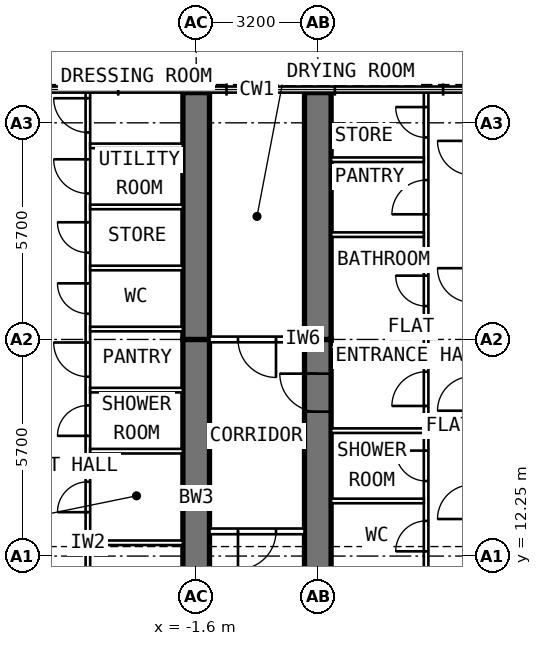
"""IFC4 building model, lengths in metres.
Left out: names, types, materials, properties, quantities, classifications, styles, units other than length and angle.
Written with IfcOpenShell. Run it as: python <this file> out.ifc"""

import sys

from ifc_helpers import new_model, si_unit, direction, frame, frame_2d, origin, place, context, subcontext, project, spatial, rectangle, extrude, element, fill, save


model = new_model("IFC4")
c1 = context("Model", 3, precision=1e-05, world=origin(), true_north=direction((0.0, 1.0)))
c2 = subcontext(c1, "Body", "Model", "MODEL_VIEW")
j1 = project(units=[si_unit("LENGTHUNIT", "METRE"), si_unit("PLANEANGLEUNIT", "RADIAN")], contexts=[c1])
p1 = place(None, origin())
s1 = spatial("IfcSite", under=j1, at=p1, CompositionType="ELEMENT")
p2 = place(p1, origin())
s2 = spatial("IfcBuilding", under=s1, at=p2, CompositionType="ELEMENT")
p3 = place(p2, frame((0.0, 0.0, 292.6)))
s3 = spatial("IfcBuildingStorey", under=s2, at=p3, CompositionType="ELEMENT", Elevation=292.6)
p4 = place(p3, frame((-1.6, 9.6, 0.0), z_axis=(0.0, 0.0, 1.0), x_axis=(0.0, 1.0, 0.0)))
e1 = element("IfcWall", 1, at=p4, inside=s3, PredefinedType="SHEAR", context=c2, shape_type="SweptSolid", body=[
    extrude(rectangle(XDim=8.35, YDim=0.7, at=frame_2d((4.175, 0.0))), origin(), (0.0, 0.0, 1.0), 3.6),
])
p5 = place(p4, frame((1.3, 0.0, 0.0)))
e2 = element("IfcOpeningElement", 2, at=p5, cuts=e1, PredefinedType="OPENING", context=c2, shape_type="SweptSolid", body=[
    extrude(rectangle(XDim=1.0, YDim=2.1, at=frame_2d((0.5, 1.05))), frame((0.0, 0.362, 0.0), z_axis=(0.0, -1.0, 0.0), x_axis=(1.0, 0.0, 0.0)), (0.0, 0.0, 1.0), 0.724),
])
p6 = place(p3, frame((-1.6, 17.95, 0.0), z_axis=(0.0, 0.0, 1.0), x_axis=(0.0, 1.0, 0.0)))
e3 = element("IfcWall", 3, at=p6, inside=s3, PredefinedType="SHEAR", context=c2, shape_type="SweptSolid", body=[
    extrude(rectangle(XDim=6.495, YDim=0.7, at=frame_2d((3.248, 0.0))), origin(), (0.0, 0.0, 1.0), 3.6),
])
p7 = place(p3, frame((1.6, 9.6, 0.0), z_axis=(0.0, 0.0, 1.0), x_axis=(0.0, 1.0, 0.0)))
e4 = element("IfcWall", 4, at=p7, inside=s3, PredefinedType="SHEAR", context=c2, shape_type="SweptSolid", body=[
    extrude(rectangle(XDim=8.35, YDim=0.7, at=frame_2d((4.175, 0.0))), origin(), (0.0, 0.0, 1.0), 3.6),
])
p8 = place(p7, frame((6.45, 0.0, 0.0)))
e5 = element("IfcOpeningElement", 5, at=p8, cuts=e4, PredefinedType="OPENING", context=c2, shape_type="SweptSolid", body=[
    extrude(rectangle(XDim=1.0, YDim=2.1, at=frame_2d((0.5, 1.05))), frame((0.0, 0.362, 0.0), z_axis=(0.0, -1.0, 0.0), x_axis=(1.0, 0.0, 0.0)), (0.0, 0.0, 1.0), 0.724),
])
p9 = place(p3, frame((1.6, 17.95, 0.0), z_axis=(0.0, 0.0, 1.0), x_axis=(0.0, 1.0, 0.0)))
e6 = element("IfcWall", 6, at=p9, inside=s3, PredefinedType="SHEAR", context=c2, shape_type="SweptSolid", body=[
    extrude(rectangle(XDim=6.495, YDim=0.7, at=frame_2d((3.248, 0.0))), origin(), (0.0, 0.0, 1.0), 3.6),
])
p10 = place(p3, frame((-4.45, 9.85, 0.0), z_axis=(0.0, 0.0, 1.0), x_axis=(0.0, 1.0, 0.0)))
e7 = element("IfcWall", 7, at=p10, inside=s3, PredefinedType="PARTITIONING", context=c2, shape_type="SweptSolid", body=[
    extrude(rectangle(XDim=14.595, YDim=0.12, at=frame_2d((7.297, 0.0))), origin(), (0.0, 0.0, 1.0), 3.35),
])
p11 = place(p10, frame((1.0, 0.0, 0.0)))
e8 = element("IfcOpeningElement", 8, at=p11, cuts=e7, PredefinedType="OPENING", context=c2, shape_type="SweptSolid", body=[
    extrude(rectangle(XDim=0.9, YDim=2.1, at=frame_2d((0.45, 1.05))), frame((0.0, 0.072, 0.0), z_axis=(0.0, -1.0, 0.0), x_axis=(1.0, 0.0, 0.0)), (0.0, 0.0, 1.0), 0.144),
])
p12 = place(p10, frame((3.555, 0.0, 0.0)))
e9 = element("IfcOpeningElement", 9, at=p12, cuts=e7, PredefinedType="OPENING", context=c2, shape_type="SweptSolid", body=[
    extrude(rectangle(XDim=0.8, YDim=2.1, at=frame_2d((0.4, 1.05))), frame((0.0, 0.072, 0.0), z_axis=(0.0, -1.0, 0.0), x_axis=(1.0, 0.0, 0.0)), (0.0, 0.0, 1.0), 0.144),
])
p13 = place(p10, frame((5.563, 0.0, 0.0)))
e10 = element("IfcOpeningElement", 10, at=p13, cuts=e7, PredefinedType="OPENING", context=c2, shape_type="SweptSolid", body=[
    extrude(rectangle(XDim=0.8, YDim=2.1, at=frame_2d((0.4, 1.05))), frame((0.0, 0.072, 0.0), z_axis=(0.0, -1.0, 0.0), x_axis=(1.0, 0.0, 0.0)), (0.0, 0.0, 1.0), 0.144),
])
p14 = place(p10, frame((7.12, 0.0, 0.0)))
e11 = element("IfcOpeningElement", 11, at=p14, cuts=e7, PredefinedType="OPENING", context=c2, shape_type="SweptSolid", body=[
    extrude(rectangle(XDim=0.9, YDim=2.1, at=frame_2d((0.45, 1.05))), frame((0.0, 0.072, 0.0), z_axis=(0.0, -1.0, 0.0), x_axis=(1.0, 0.0, 0.0)), (0.0, 0.0, 1.0), 0.144),
])
p15 = place(p10, frame((8.777, 0.0, 0.0)))
e12 = element("IfcOpeningElement", 12, at=p15, cuts=e7, PredefinedType="OPENING", context=c2, shape_type="SweptSolid", body=[
    extrude(rectangle(XDim=0.8, YDim=2.1, at=frame_2d((0.4, 1.05))), frame((0.0, 0.072, 0.0), z_axis=(0.0, -1.0, 0.0), x_axis=(1.0, 0.0, 0.0)), (0.0, 0.0, 1.0), 0.144),
])
p16 = place(p10, frame((10.383, 0.0, 0.0)))
e13 = element("IfcOpeningElement", 13, at=p16, cuts=e7, PredefinedType="OPENING", context=c2, shape_type="SweptSolid", body=[
    extrude(rectangle(XDim=0.8, YDim=2.1, at=frame_2d((0.4, 1.05))), frame((0.0, 0.072, 0.0), z_axis=(0.0, -1.0, 0.0), x_axis=(1.0, 0.0, 0.0)), (0.0, 0.0, 1.0), 0.144),
])
p17 = place(p10, frame((11.94, 0.0, 0.0)))
e14 = element("IfcOpeningElement", 14, at=p17, cuts=e7, PredefinedType="OPENING", context=c2, shape_type="SweptSolid", body=[
    extrude(rectangle(XDim=0.9, YDim=2.1, at=frame_2d((0.45, 1.05))), frame((0.0, 0.072, 0.0), z_axis=(0.0, -1.0, 0.0), x_axis=(1.0, 0.0, 0.0)), (0.0, 0.0, 1.0), 0.144),
])
p18 = place(p10, frame((13.547, 0.0, 0.0)))
e15 = element("IfcOpeningElement", 15, at=p18, cuts=e7, PredefinedType="OPENING", context=c2, shape_type="SweptSolid", body=[
    extrude(rectangle(XDim=0.9, YDim=2.1, at=frame_2d((0.45, 1.05))), frame((0.0, 0.072, 0.0), z_axis=(0.0, -1.0, 0.0), x_axis=(1.0, 0.0, 0.0)), (0.0, 0.0, 1.0), 0.144),
])
p19 = place(p3, frame((-1.95, 12.6, 0.0), z_axis=(0.0, 0.0, 1.0), x_axis=(-1.0, 0.0, 0.0)))
e16 = element("IfcWall", 16, at=p19, inside=s3, PredefinedType="PARTITIONING", context=c2, shape_type="SweptSolid", body=[
    extrude(rectangle(XDim=2.44, YDim=0.12, at=frame_2d((1.22, 0.0))), origin(), (0.0, 0.0, 1.0), 2.45),
])
for number, where, z_axis, x_axis in (
    (17, (-1.95, 15.01, 0.0), (0.0, 0.0, 1.0), (-1.0, 0.0, 0.0)),
    (18, (-1.95, 16.617, 0.0), (0.0, 0.0, 1.0), (-1.0, 0.0, 0.0)),
):
    element("IfcWall", number, at=place(p3, frame(where, z_axis=z_axis, x_axis=x_axis)), inside=s3, PredefinedType="PARTITIONING", context=c2, shape_type="SweptSolid", body=[
        extrude(rectangle(XDim=2.44, YDim=0.12, at=frame_2d((1.22, 0.0))), origin(), (0.0, 0.0, 1.0), 3.35),
    ])
p20 = place(p3, frame((-1.95, 18.223, 0.0), z_axis=(0.0, 0.0, 1.0), x_axis=(-1.0, 0.0, 0.0)))
e19 = element("IfcWall", 19, at=p20, inside=s3, PredefinedType="PARTITIONING", context=c2, shape_type="SweptSolid", body=[
    extrude(rectangle(XDim=2.44, YDim=0.12, at=frame_2d((1.22, 0.0))), origin(), (0.0, 0.0, 1.0), 2.45),
])
for number, where, z_axis, x_axis in (
    (20, (-1.95, 19.83, 0.0), (0.0, 0.0, 1.0), (-1.0, 0.0, 0.0)),
    (21, (-1.95, 21.437, 0.0), (0.0, 0.0, 1.0), (-1.0, 0.0, 0.0)),
    (22, (-1.95, 23.043, 0.0), (0.0, 0.0, 1.0), (-1.0, 0.0, 0.0)),
):
    element("IfcWall", number, at=place(p3, frame(where, z_axis=z_axis, x_axis=x_axis)), inside=s3, PredefinedType="PARTITIONING", context=c2, shape_type="SweptSolid", body=[
        extrude(rectangle(XDim=2.44, YDim=0.12, at=frame_2d((1.22, 0.0))), origin(), (0.0, 0.0, 1.0), 3.35),
    ])
p21 = place(p3, frame((4.45, 9.85, 0.0), z_axis=(0.0, 0.0, 1.0), x_axis=(0.0, 1.0, 0.0)))
e23 = element("IfcWall", 23, at=p21, inside=s3, PredefinedType="PARTITIONING", context=c2, shape_type="SweptSolid", body=[
    extrude(rectangle(XDim=14.595, YDim=0.12, at=frame_2d((7.297, 0.0))), origin(), (0.0, 0.0, 1.0), 3.35),
])
p22 = place(p21, frame((0.625, 0.0, 0.0)))
e24 = element("IfcOpeningElement", 24, at=p22, cuts=e23, PredefinedType="OPENING", context=c2, shape_type="SweptSolid", body=[
    extrude(rectangle(XDim=0.9, YDim=2.1, at=frame_2d((0.45, 1.05))), frame((0.0, 0.072, 0.0), z_axis=(0.0, -1.0, 0.0), x_axis=(1.0, 0.0, 0.0)), (0.0, 0.0, 1.0), 0.144),
])
p23 = place(p21, frame((2.525, 0.0, 0.0)))
e25 = element("IfcOpeningElement", 25, at=p23, cuts=e23, PredefinedType="OPENING", context=c2, shape_type="SweptSolid", body=[
    extrude(rectangle(XDim=0.8, YDim=2.1, at=frame_2d((0.4, 1.05))), frame((0.0, 0.072, 0.0), z_axis=(0.0, -1.0, 0.0), x_axis=(1.0, 0.0, 0.0)), (0.0, 0.0, 1.0), 0.144),
])
p24 = place(p21, frame((4.375, 0.0, 0.0)))
e26 = element("IfcOpeningElement", 26, at=p24, cuts=e23, PredefinedType="OPENING", context=c2, shape_type="SweptSolid", body=[
    extrude(rectangle(XDim=0.8, YDim=2.1, at=frame_2d((0.4, 1.05))), frame((0.0, 0.072, 0.0), z_axis=(0.0, -1.0, 0.0), x_axis=(1.0, 0.0, 0.0)), (0.0, 0.0, 1.0), 0.144),
])
p25 = place(p21, frame((6.35, 0.0, 0.0)))
e27 = element("IfcOpeningElement", 27, at=p25, cuts=e23, PredefinedType="OPENING", context=c2, shape_type="SweptSolid", body=[
    extrude(rectangle(XDim=0.9, YDim=2.1, at=frame_2d((0.45, 1.05))), frame((0.0, 0.072, 0.0), z_axis=(0.0, -1.0, 0.0), x_axis=(1.0, 0.0, 0.0)), (0.0, 0.0, 1.0), 0.144),
])
p26 = place(p21, frame((8.979, 0.0, 0.0)))
e28 = element("IfcOpeningElement", 28, at=p26, cuts=e23, PredefinedType="OPENING", context=c2, shape_type="SweptSolid", body=[
    extrude(rectangle(XDim=0.8, YDim=2.1, at=frame_2d((0.4, 1.05))), frame((0.0, 0.072, 0.0), z_axis=(0.0, -1.0, 0.0), x_axis=(1.0, 0.0, 0.0)), (0.0, 0.0, 1.0), 0.144),
])
p27 = place(p21, frame((11.393, 0.0, 0.0)))
e29 = element("IfcOpeningElement", 29, at=p27, cuts=e23, PredefinedType="OPENING", context=c2, shape_type="SweptSolid", body=[
    extrude(rectangle(XDim=0.9, YDim=2.1, at=frame_2d((0.45, 1.05))), frame((0.0, 0.072, 0.0), z_axis=(0.0, -1.0, 0.0), x_axis=(1.0, 0.0, 0.0)), (0.0, 0.0, 1.0), 0.144),
])
p28 = place(p21, frame((13.414, 0.0, 0.0)))
e30 = element("IfcOpeningElement", 30, at=p28, cuts=e23, PredefinedType="OPENING", context=c2, shape_type="SweptSolid", body=[
    extrude(rectangle(XDim=0.8, YDim=2.1, at=frame_2d((0.4, 1.05))), frame((0.0, 0.072, 0.0), z_axis=(0.0, -1.0, 0.0), x_axis=(1.0, 0.0, 0.0)), (0.0, 0.0, 1.0), 0.144),
])
for number, where, z_axis, x_axis in (
    (31, (1.95, 13.7, 0.0), (0.0, 0.0, 1.0), (1.0, 0.0, 0.0)),
    (32, (1.95, 15.55, 0.0), (0.0, 0.0, 1.0), (1.0, 0.0, 0.0)),
):
    element("IfcWall", number, at=place(p3, frame(where, z_axis=z_axis, x_axis=x_axis)), inside=s3, PredefinedType="PARTITIONING", context=c2, shape_type="SweptSolid", body=[
        extrude(rectangle(XDim=2.44, YDim=0.12, at=frame_2d((1.22, 0.0))), origin(), (0.0, 0.0, 1.0), 3.35),
    ])
p29 = place(p3, frame((1.95, 17.75, 0.0), z_axis=(0.0, 0.0, 1.0), x_axis=(1.0, 0.0, 0.0)))
e33 = element("IfcWall", 33, at=p29, inside=s3, PredefinedType="PARTITIONING", context=c2, shape_type="SweptSolid", body=[
    extrude(rectangle(XDim=2.44, YDim=0.12, at=frame_2d((1.22, 0.0))), origin(), (0.0, 0.0, 1.0), 2.45),
])
for number, where, z_axis, x_axis in (
    (34, (1.95, 20.707, 0.0), (0.0, 0.0, 1.0), (1.0, 0.0, 0.0)),
    (35, (1.95, 22.678, 0.0), (0.0, 0.0, 1.0), (1.0, 0.0, 0.0)),
):
    element("IfcWall", number, at=place(p3, frame(where, z_axis=z_axis, x_axis=x_axis)), inside=s3, PredefinedType="PARTITIONING", context=c2, shape_type="SweptSolid", body=[
        extrude(rectangle(XDim=2.44, YDim=0.12, at=frame_2d((1.22, 0.0))), origin(), (0.0, 0.0, 1.0), 3.35),
    ])
p30 = place(p3, frame((1.25, 17.95, 0.0), z_axis=(0.0, 0.0, 1.0), x_axis=(-1.0, 0.0, 0.0)))
e36 = element("IfcWall", 36, at=p30, inside=s3, PredefinedType="PARTITIONING", context=c2, shape_type="SweptSolid", body=[
    extrude(rectangle(XDim=2.5, YDim=0.15, at=frame_2d((1.25, 0.0))), origin(), (0.0, 0.0, 1.0), 3.35),
])
p31 = place(p30, frame((0.75, 0.0, 0.0)))
e37 = element("IfcOpeningElement", 37, at=p31, cuts=e36, PredefinedType="OPENING", context=c2, shape_type="SweptSolid", body=[
    extrude(rectangle(XDim=1.0, YDim=2.1, at=frame_2d((0.5, 1.05))), frame((0.0, 0.087, 0.0), z_axis=(0.0, -1.0, 0.0), x_axis=(1.0, 0.0, 0.0)), (0.0, 0.0, 1.0), 0.174),
])
p32 = place(p3, frame((1.25, 12.9, 0.0), z_axis=(0.0, 0.0, 1.0), x_axis=(-1.0, 0.0, 0.0)))
e38 = element("IfcWall", 38, at=p32, inside=s3, PredefinedType="PARTITIONING", context=c2, shape_type="SweptSolid", body=[
    extrude(rectangle(XDim=2.5, YDim=0.15, at=frame_2d((1.25, 0.0))), origin(), (0.0, 0.0, 1.0), 3.35),
])
p33 = place(p32, frame((0.75, 0.0, 0.0)))
e39 = element("IfcOpeningElement", 39, at=p33, cuts=e38, PredefinedType="OPENING", context=c2, shape_type="SweptSolid", body=[
    extrude(rectangle(XDim=1.0, YDim=2.1, at=frame_2d((0.5, 1.05))), frame((0.0, 0.087, 0.0), z_axis=(0.0, -1.0, 0.0), x_axis=(1.0, 0.0, 0.0)), (0.0, 0.0, 1.0), 0.174),
])
p34 = place(p12, origin())
e40 = element("IfcDoor", 40, at=p34, inside=s3, OperationType="SINGLE_SWING_LEFT", PredefinedType="DOOR", context=c2, shape_type="SweptSolid", body=[
    extrude(rectangle(XDim=0.8, YDim=2.1, at=frame_2d((0.4, 1.05))), frame((0.0, 0.025, 0.0), z_axis=(0.0, -1.0, 0.0), x_axis=(1.0, 0.0, 0.0)), (0.0, 0.0, 1.0), 0.05),
])
fill(e9, e40)
p35 = place(p13, origin())
e41 = element("IfcDoor", 41, at=p35, inside=s3, OperationType="SINGLE_SWING_LEFT", PredefinedType="DOOR", context=c2, shape_type="SweptSolid", body=[
    extrude(rectangle(XDim=0.8, YDim=2.1, at=frame_2d((0.4, 1.05))), frame((0.0, 0.025, 0.0), z_axis=(0.0, -1.0, 0.0), x_axis=(1.0, 0.0, 0.0)), (0.0, 0.0, 1.0), 0.05),
])
fill(e10, e41)
p36 = place(p14, origin())
e42 = element("IfcDoor", 42, at=p36, inside=s3, OperationType="SINGLE_SWING_RIGHT", PredefinedType="DOOR", context=c2, shape_type="SweptSolid", body=[
    extrude(rectangle(XDim=0.9, YDim=2.1, at=frame_2d((0.45, 1.05))), frame((0.0, 0.025, 0.0), z_axis=(0.0, -1.0, 0.0), x_axis=(1.0, 0.0, 0.0)), (0.0, 0.0, 1.0), 0.05),
])
fill(e11, e42)
p37 = place(p15, origin())
e43 = element("IfcDoor", 43, at=p37, inside=s3, OperationType="SINGLE_SWING_RIGHT", PredefinedType="DOOR", context=c2, shape_type="SweptSolid", body=[
    extrude(rectangle(XDim=0.8, YDim=2.1, at=frame_2d((0.4, 1.05))), frame((0.0, 0.025, 0.0), z_axis=(0.0, -1.0, 0.0), x_axis=(1.0, 0.0, 0.0)), (0.0, 0.0, 1.0), 0.05),
])
fill(e12, e43)
p38 = place(p16, origin())
e44 = element("IfcDoor", 44, at=p38, inside=s3, OperationType="SINGLE_SWING_RIGHT", PredefinedType="DOOR", context=c2, shape_type="SweptSolid", body=[
    extrude(rectangle(XDim=0.8, YDim=2.1, at=frame_2d((0.4, 1.05))), frame((0.0, 0.025, 0.0), z_axis=(0.0, -1.0, 0.0), x_axis=(1.0, 0.0, 0.0)), (0.0, 0.0, 1.0), 0.05),
])
fill(e13, e44)
p39 = place(p17, origin())
e45 = element("IfcDoor", 45, at=p39, inside=s3, OperationType="SINGLE_SWING_RIGHT", PredefinedType="DOOR", context=c2, shape_type="SweptSolid", body=[
    extrude(rectangle(XDim=0.9, YDim=2.1, at=frame_2d((0.45, 1.05))), frame((0.0, 0.025, 0.0), z_axis=(0.0, -1.0, 0.0), x_axis=(1.0, 0.0, 0.0)), (0.0, 0.0, 1.0), 0.05),
])
fill(e14, e45)
p40 = place(p18, origin())
e46 = element("IfcDoor", 46, at=p40, inside=s3, OperationType="SINGLE_SWING_RIGHT", PredefinedType="DOOR", context=c2, shape_type="SweptSolid", body=[
    extrude(rectangle(XDim=0.9, YDim=2.1, at=frame_2d((0.45, 1.05))), frame((0.0, 0.025, 0.0), z_axis=(0.0, -1.0, 0.0), x_axis=(1.0, 0.0, 0.0)), (0.0, 0.0, 1.0), 0.05),
])
fill(e15, e46)
p41 = place(p8, origin())
e47 = element("IfcDoor", 47, at=p41, inside=s3, OperationType="SINGLE_SWING_RIGHT", PredefinedType="DOOR", context=c2, shape_type="SweptSolid", body=[
    extrude(rectangle(XDim=1.0, YDim=2.1, at=frame_2d((0.5, 1.05))), frame((0.0, 0.1, 0.0), z_axis=(0.0, -1.0, 0.0), x_axis=(1.0, 0.0, 0.0)), (0.0, 0.0, 1.0), 0.2),
])
fill(e5, e47)
p42 = place(p23, origin())
e48 = element("IfcDoor", 48, at=p42, inside=s3, OperationType="SINGLE_SWING_LEFT", PredefinedType="DOOR", context=c2, shape_type="SweptSolid", body=[
    extrude(rectangle(XDim=0.8, YDim=2.1, at=frame_2d((0.4, 1.05))), frame((0.0, 0.025, 0.0), z_axis=(0.0, -1.0, 0.0), x_axis=(1.0, 0.0, 0.0)), (0.0, 0.0, 1.0), 0.05),
])
fill(e25, e48)
p43 = place(p24, origin())
e49 = element("IfcDoor", 49, at=p43, inside=s3, OperationType="SINGLE_SWING_RIGHT", PredefinedType="DOOR", context=c2, shape_type="SweptSolid", body=[
    extrude(rectangle(XDim=0.8, YDim=2.1, at=frame_2d((0.4, 1.05))), frame((0.0, 0.025, 0.0), z_axis=(0.0, -1.0, 0.0), x_axis=(1.0, 0.0, 0.0)), (0.0, 0.0, 1.0), 0.05),
])
fill(e26, e49)
p44 = place(p25, origin())
e50 = element("IfcDoor", 50, at=p44, inside=s3, OperationType="SINGLE_SWING_LEFT", PredefinedType="DOOR", context=c2, shape_type="SweptSolid", body=[
    extrude(rectangle(XDim=0.9, YDim=2.1, at=frame_2d((0.45, 1.05))), frame((0.0, 0.025, 0.0), z_axis=(0.0, -1.0, 0.0), x_axis=(1.0, 0.0, 0.0)), (0.0, 0.0, 1.0), 0.05),
])
fill(e27, e50)
p45 = place(p26, origin())
e51 = element("IfcDoor", 51, at=p45, inside=s3, OperationType="SINGLE_SWING_RIGHT", PredefinedType="DOOR", context=c2, shape_type="SweptSolid", body=[
    extrude(rectangle(XDim=0.8, YDim=2.1, at=frame_2d((0.4, 1.05))), frame((0.0, 0.025, 0.0), z_axis=(0.0, -1.0, 0.0), x_axis=(1.0, 0.0, 0.0)), (0.0, 0.0, 1.0), 0.05),
])
fill(e28, e51)
p46 = place(p27, origin())
e52 = element("IfcDoor", 52, at=p46, inside=s3, OperationType="SINGLE_SWING_LEFT", PredefinedType="DOOR", context=c2, shape_type="SweptSolid", body=[
    extrude(rectangle(XDim=0.9, YDim=2.1, at=frame_2d((0.45, 1.05))), frame((0.0, 0.025, 0.0), z_axis=(0.0, -1.0, 0.0), x_axis=(1.0, 0.0, 0.0)), (0.0, 0.0, 1.0), 0.05),
])
fill(e29, e52)
p47 = place(p28, origin())
e53 = element("IfcDoor", 53, at=p47, inside=s3, OperationType="SINGLE_SWING_RIGHT", PredefinedType="DOOR", context=c2, shape_type="SweptSolid", body=[
    extrude(rectangle(XDim=0.8, YDim=2.1, at=frame_2d((0.4, 1.05))), frame((0.0, 0.025, 0.0), z_axis=(0.0, -1.0, 0.0), x_axis=(1.0, 0.0, 0.0)), (0.0, 0.0, 1.0), 0.05),
])
fill(e30, e53)
p48 = place(p31, origin())
e54 = element("IfcDoor", 54, at=p48, inside=s3, OperationType="SINGLE_SWING_LEFT", PredefinedType="DOOR", context=c2, shape_type="SweptSolid", body=[
    extrude(rectangle(XDim=1.0, YDim=2.1, at=frame_2d((0.5, 1.05))), frame((0.0, 0.025, 0.0), z_axis=(0.0, -1.0, 0.0), x_axis=(1.0, 0.0, 0.0)), (0.0, 0.0, 1.0), 0.05),
])
fill(e37, e54)
p49 = place(p33, origin())
e55 = element("IfcDoor", 55, at=p49, inside=s3, OperationType="SINGLE_SWING_RIGHT", PredefinedType="DOOR", context=c2, shape_type="SweptSolid", body=[
    extrude(rectangle(XDim=1.0, YDim=2.1, at=frame_2d((0.5, 1.05))), frame((0.0, 0.025, 0.0), z_axis=(0.0, -1.0, 0.0), x_axis=(1.0, 0.0, 0.0)), (0.0, 0.0, 1.0), 0.05),
])
fill(e39, e55)
save(model, sys.argv[1])
